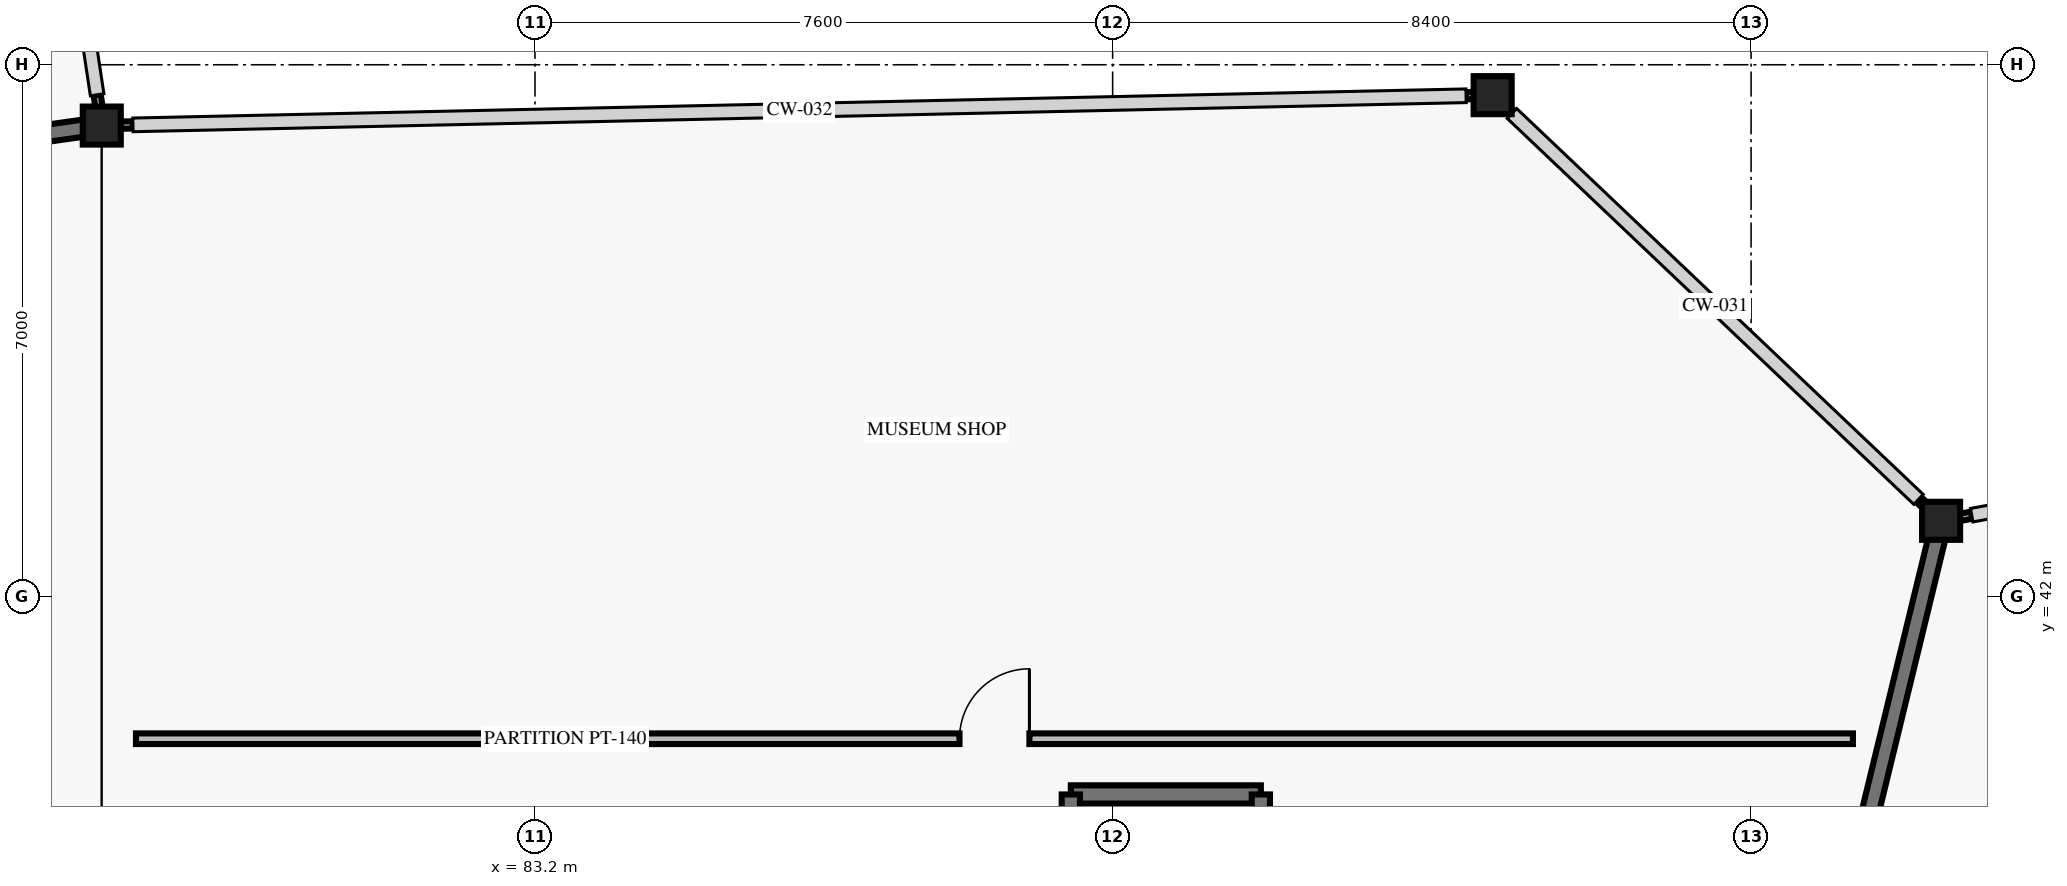
"""IFC4 building model, lengths in metres.
Left out: names, types, materials, properties, quantities, classifications, styles, units other than length and angle.
Written with IfcOpenShell. Run it as: python <this file> out.ifc"""

import sys

from ifc_helpers import new_model, si_unit, direction, frame, frame_2d, origin, origin_2d, place, context, subcontext, project, spatial, rectangle, i_section, extrude, element, fill, save


model = new_model("IFC4")
c1 = context("Model", 3, precision=1e-05, world=origin(), true_north=direction((0.0, 1.0)))
c2 = subcontext(c1, "Body", "Model", "MODEL_VIEW")
j1 = project(units=[si_unit("LENGTHUNIT", "METRE"), si_unit("PLANEANGLEUNIT", "RADIAN")], contexts=[c1])
p1 = place(None, origin())
s1 = spatial("IfcSite", under=j1, at=p1, CompositionType="ELEMENT")
p2 = place(p1, origin())
s2 = spatial("IfcBuilding", under=s1, at=p2, CompositionType="ELEMENT")
p3 = place(p2, origin())
s3 = spatial("IfcBuildingStorey", under=s2, at=p3, CompositionType="ELEMENT", Elevation=0.0)
for number, where, z_axis, x_axis in (
    (1, (77.5, 48.2, 0.0), (0.0, 0.0, 1.0), (1.0, 0.0, 0.0)),
    (2, (95.8, 48.6, 0.0), (0.0, 0.0, 1.0), (1.0, 0.0, 0.0)),
    (3, (101.7, 43.0, 0.0), (0.0, 0.0, 1.0), (1.0, 0.0, 0.0)),
):
    element("IfcColumn", number, at=place(p3, frame(where, z_axis=z_axis, x_axis=x_axis)), inside=s3, PredefinedType="COLUMN", context=c2, shape_type="SweptSolid", body=[
        extrude(i_section(OverallWidth=0.5, OverallDepth=0.5, WebThickness=0.022, FlangeThickness=0.036, at=origin_2d()), origin(), (0.0, 0.0, 1.0), 5.4),
    ])
for number, where, z_axis, x_axis in (
    (4, (95.83, 48.571, 0.0), (0.0, 0.0, 1.0), (0.726, -0.688, 0.0)),
    (5, (101.403, 43.282, 0.0), (0.0, 0.0, 1.0), (0.726, -0.687, 0.0)),
):
    element("IfcWall", number, at=place(p3, frame(where, z_axis=z_axis, x_axis=x_axis)), inside=s3, PredefinedType="SOLIDWALL", context=c2, shape_type="SweptSolid", body=[
        extrude(rectangle(XDim=0.308, YDim=0.095, at=frame_2d((0.154, 0.0))), origin(), (0.0, 0.0, 1.0), 4.22),
    ])
p4 = place(p3, frame((77.602, 48.202, 0.0), z_axis=(0.0, 0.0, 1.0), x_axis=(0.999735659566, 0.022991541735, 0.0)))
e6 = element("IfcWall", 6, at=p4, inside=s3, PredefinedType="SOLIDWALL", context=c2, shape_type="SweptSolid", body=[
    extrude(rectangle(XDim=0.308, YDim=0.095, at=frame_2d((0.154, 0.0))), origin(), (0.0, 0.0, 1.0), 4.22),
])
p5 = place(p3, frame((95.45, 48.592, 0.0), z_axis=(0.0, 0.0, 1.0), x_axis=(0.999736078158, 0.022973333016, 0.0)))
e7 = element("IfcWall", 7, at=p5, inside=s3, PredefinedType="SOLIDWALL", context=c2, shape_type="SweptSolid", body=[
    extrude(rectangle(XDim=0.308, YDim=0.095, at=frame_2d((0.154, 0.0))), origin(), (0.0, 0.0, 1.0), 4.22),
])
p6 = place(p3, frame((77.439, 48.605, 0.0), z_axis=(0.0, 0.0, 1.0), x_axis=(0.15008766182, -0.988672692942, 0.0)))
e8 = element("IfcWall", 8, at=p6, inside=s3, PredefinedType="SOLIDWALL", context=c2, shape_type="SweptSolid", body=[
    extrude(rectangle(XDim=0.307, YDim=0.095, at=frame_2d((0.154, 0.0))), origin(), (0.0, 0.0, 1.0), 4.22),
])
p7 = place(p3, frame((101.8, 43.019, 0.0), z_axis=(0.0, 0.0, 1.0), x_axis=(0.983958590936, 0.178397004803, 0.0)))
e9 = element("IfcWall", 9, at=p7, inside=s3, PredefinedType="SOLIDWALL", context=c2, shape_type="SweptSolid", body=[
    extrude(rectangle(XDim=0.308, YDim=0.095, at=frame_2d((0.154, 0.0))), origin(), (0.0, 0.0, 1.0), 4.22),
])
p8 = place(p3, frame((77.5, 48.2, 0.0), z_axis=(0.0, 0.0, 1.0), x_axis=(-0.990181159322, -0.139790098807, 0.0)))
e10 = element("IfcWall", 10, at=p8, inside=s3, PredefinedType="SOLIDWALL", context=c2, shape_type="SweptSolid", body=[
    extrude(rectangle(XDim=15.738, YDim=0.225, at=frame_2d((7.869, 0.0))), origin(), (0.0, 0.0, 1.0), 4.62),
])
p9 = place(p8, frame((6.769, 0.0, 0.0)))
e11 = element("IfcOpeningElement", 11, at=p9, cuts=e10, PredefinedType="OPENING", context=c2, shape_type="SweptSolid", body=[
    extrude(rectangle(XDim=2.2, YDim=2.6, at=frame_2d((1.1, 1.3))), frame((0.0, 0.123, 0.0), z_axis=(0.0, -1.0, 0.0), x_axis=(1.0, 0.0, 0.0)), (0.0, 0.0, 1.0), 0.245),
])
p10 = place(p3, frame((98.1, 28.2, 0.0), z_axis=(0.0, 0.0, 1.0), x_axis=(0.236341762997, 0.971669990822, 0.0)))
e12 = element("IfcWall", 12, at=p10, inside=s3, PredefinedType="SOLIDWALL", context=c2, shape_type="SweptSolid", body=[
    extrude(rectangle(XDim=15.231, YDim=0.225, at=frame_2d((7.616, 0.0))), origin(), (0.0, 0.0, 1.0), 4.62),
])
p11 = place(p10, frame((6.516, 0.0, 0.0)))
e13 = element("IfcOpeningElement", 13, at=p11, cuts=e12, PredefinedType="OPENING", context=c2, shape_type="SweptSolid", body=[
    extrude(rectangle(XDim=2.2, YDim=2.6, at=frame_2d((1.1, 1.3))), frame((0.0, 0.123, 0.0), z_axis=(0.0, -1.0, 0.0), x_axis=(1.0, 0.0, 0.0)), (0.0, 0.0, 1.0), 0.245),
])
p12 = place(p3, frame((77.95, 40.133, 0.0), z_axis=(0.0, 0.0, 1.0), x_axis=(1.0, 0.0, 0.0)))
e14 = element("IfcWall", 14, at=p12, inside=s3, PredefinedType="PARTITIONING", context=c2, shape_type="SweptSolid", body=[
    extrude(rectangle(XDim=22.59, YDim=0.14, at=frame_2d((11.295, 0.0))), origin(), (0.0, 0.0, 1.0), 3.92),
])
p13 = place(p12, frame((10.835, 0.0, 0.0)))
e15 = element("IfcOpeningElement", 15, at=p13, cuts=e14, PredefinedType="OPENING", context=c2, shape_type="SweptSolid", body=[
    extrude(rectangle(XDim=0.92, YDim=2.1, at=frame_2d((0.46, 1.05))), frame((0.0, 0.08, 0.0), z_axis=(0.0, -1.0, 0.0), x_axis=(1.0, 0.0, 0.0)), (0.0, 0.0, 1.0), 0.16),
])
p14 = place(p3, frame((90.25, 39.4, 0.0), z_axis=(0.0, 0.0, 1.0), x_axis=(1.0, 0.0, 0.0)))
e16 = element("IfcWall", 16, at=p14, inside=s3, PredefinedType="SHEAR", context=c2, shape_type="SweptSolid", body=[
    extrude(rectangle(XDim=2.5, YDim=0.24, at=frame_2d((1.25, 0.0))), origin(), (0.0, 0.0, 1.0), 5.16),
])
for number, where, z_axis, x_axis in (
    (17, (92.75, 39.4, 0.0), (0.0, 0.0, 1.0), (0.0, -1.0, 0.0)),
    (18, (90.25, 36.6, 0.0), (0.0, 0.0, 1.0), (0.0, 1.0, 0.0)),
):
    element("IfcWall", number, at=place(p3, frame(where, z_axis=z_axis, x_axis=x_axis)), inside=s3, PredefinedType="SHEAR", context=c2, shape_type="SweptSolid", body=[
        extrude(rectangle(XDim=2.8, YDim=0.24, at=frame_2d((1.4, 0.0))), origin(), (0.0, 0.0, 1.0), 5.16),
    ])
p15 = place(p13, origin())
e19 = element("IfcDoor", 19, at=p15, inside=s3, OperationType="SINGLE_SWING_RIGHT", PredefinedType="DOOR", context=c2, shape_type="SweptSolid", body=[
    extrude(rectangle(XDim=0.92, YDim=2.1, at=frame_2d((0.46, 1.05))), frame((0.0, 0.025, 0.0), z_axis=(0.0, -1.0, 0.0), x_axis=(1.0, 0.0, 0.0)), (0.0, 0.0, 1.0), 0.05),
])
fill(e15, e19)
save(model, sys.argv[1])
